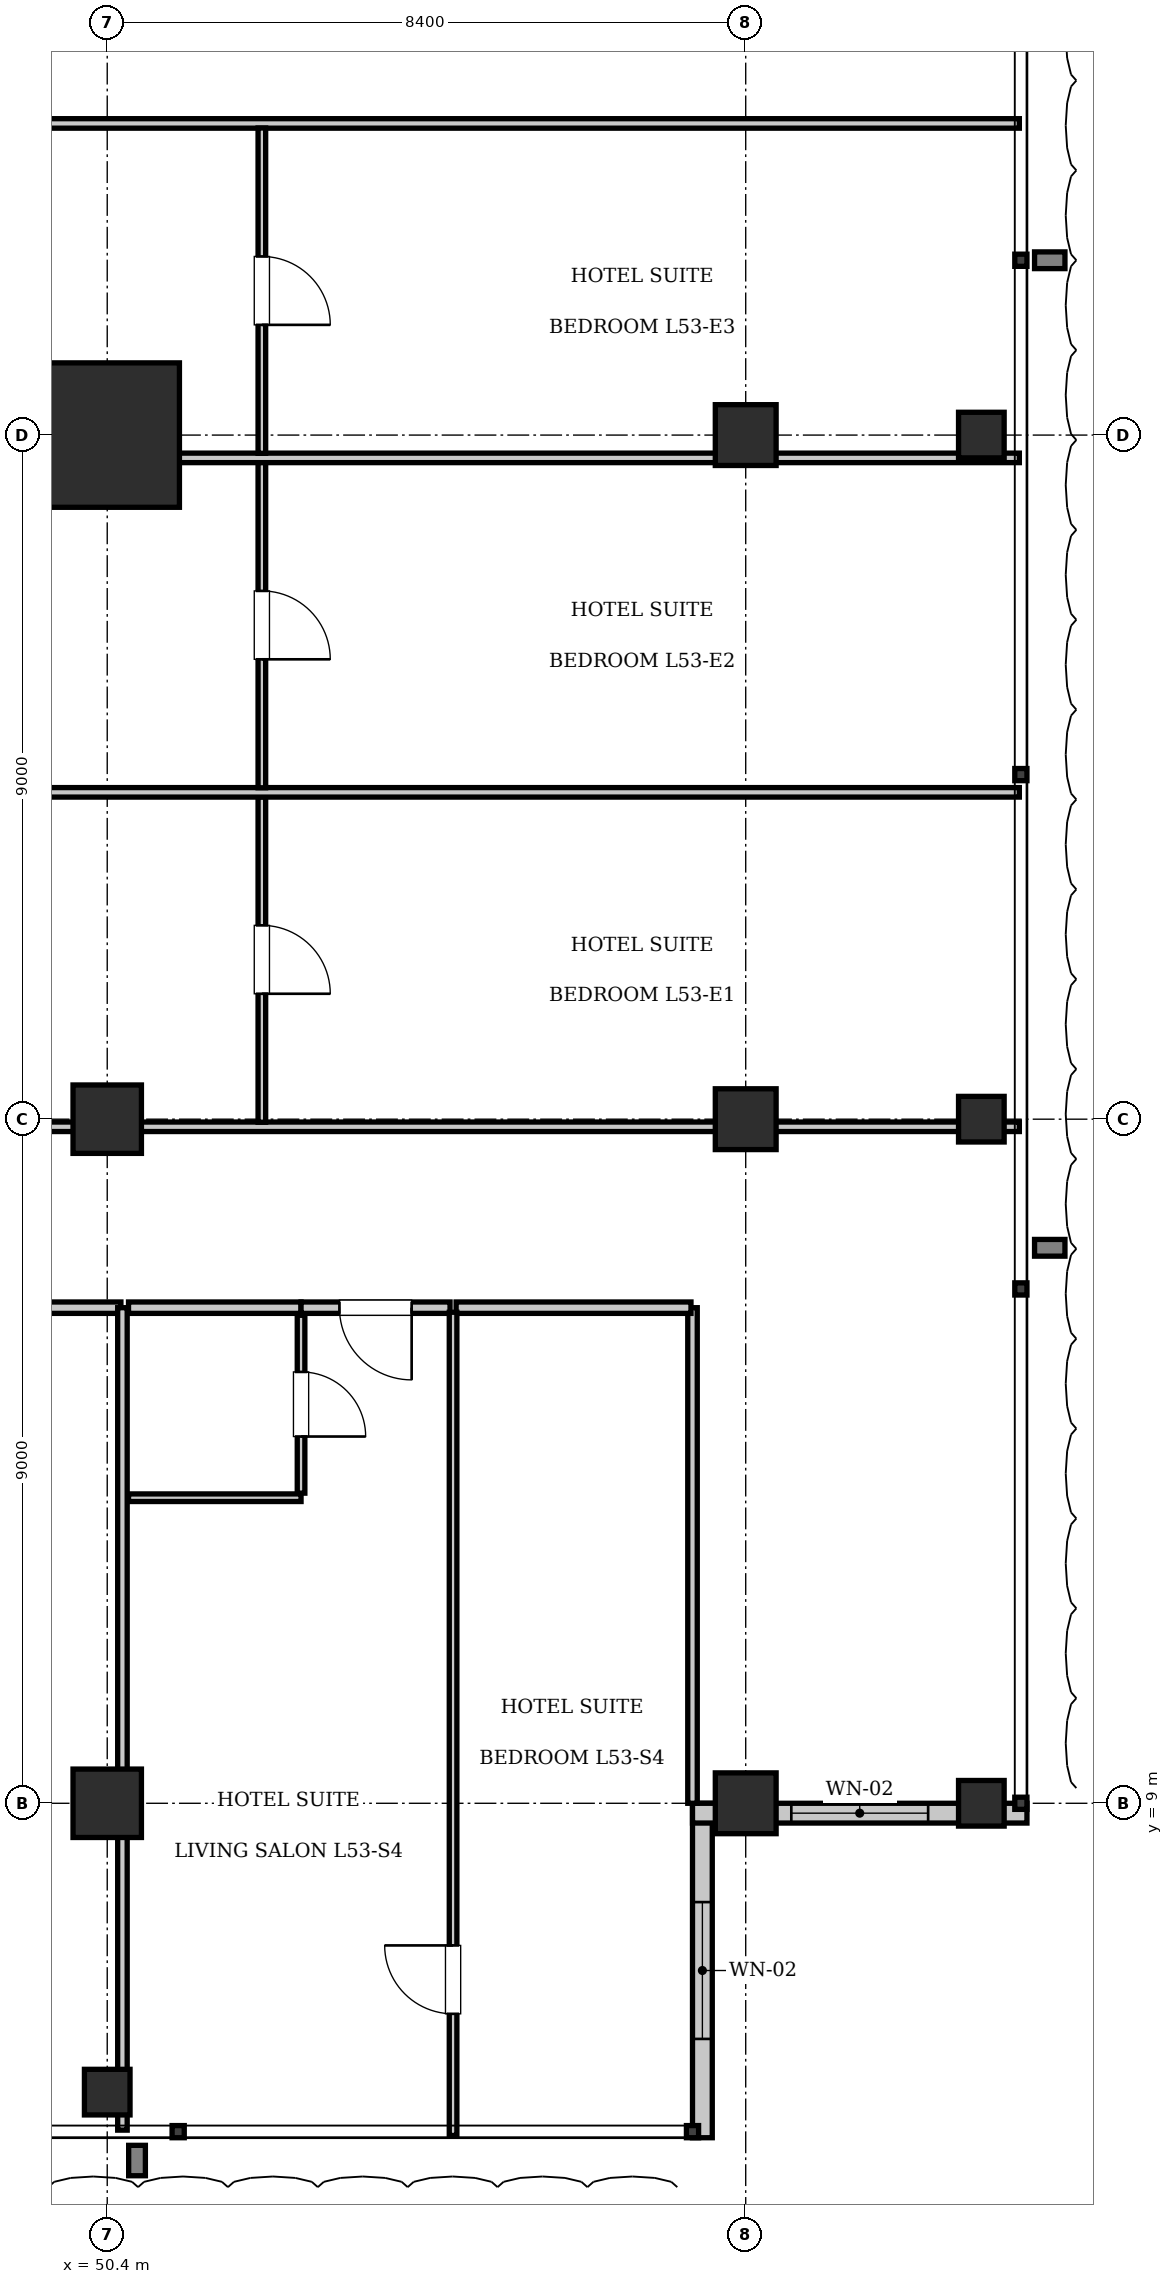
"""IFC4 building model, lengths in metres.
Left out: names, types, materials, properties, quantities, classifications, styles, units other than length and angle.
Written with IfcOpenShell. Run it as: python <this file> out.ifc"""

import sys

from ifc_helpers import new_model, si_unit, direction, frame, frame_2d, origin, origin_2d, place, context, subcontext, project, spatial, rectangle, i_section, extrude, element, fill, save


model = new_model("IFC4")
c1 = context("Model", 3, precision=1e-05, world=origin(), true_north=direction((0.0, 1.0)))
c2 = subcontext(c1, "Body", "Model", "MODEL_VIEW")
j1 = project(units=[si_unit("LENGTHUNIT", "METRE"), si_unit("PLANEANGLEUNIT", "RADIAN")], contexts=[c1])
p1 = place(None, origin())
s1 = spatial("IfcSite", under=j1, at=p1, CompositionType="ELEMENT")
p2 = place(p1, origin())
s2 = spatial("IfcBuilding", under=s1, at=p2, CompositionType="ELEMENT")
p3 = place(p2, frame((0.0, 0.0, 215.95)))
s3 = spatial("IfcBuildingStorey", under=s2, at=p3, CompositionType="ELEMENT", Elevation=215.95)
p4 = place(p3, frame((50.4, 27.0, 0.0), z_axis=(0.0, 0.0, 1.0), x_axis=(1.0, 0.0, 0.0)))
e1 = element("IfcColumn", 1, at=p4, inside=s3, PredefinedType="COLUMN", context=c2, shape_type="SweptSolid", body=[
    extrude(rectangle(XDim=1.9, YDim=1.9, at=origin_2d()), origin(), (0.0, 0.0, 1.0), 3.85),
])
for number, where, z_axis, x_axis in (
    (2, (50.4, 18.0, 0.0), (0.0, 0.0, 1.0), (1.0, 0.0, 0.0)),
    (3, (50.4, 9.0, 0.0), (0.0, 0.0, 1.0), (1.0, 0.0, 0.0)),
):
    element("IfcColumn", number, at=place(p3, frame(where, z_axis=z_axis, x_axis=x_axis)), inside=s3, PredefinedType="COLUMN", context=c2, shape_type="SweptSolid", body=[
        extrude(rectangle(XDim=0.9, YDim=0.9, at=origin_2d()), origin(), (0.0, 0.0, 1.0), 3.85),
    ])
for number, where, z_axis, x_axis in (
    (4, (58.8, 9.0, 0.0), (0.0, 0.0, 1.0), (1.0, 0.0, 0.0)),
    (5, (58.8, 18.0, 0.0), (0.0, 0.0, 1.0), (1.0, 0.0, 0.0)),
    (6, (58.8, 27.0, 0.0), (0.0, 0.0, 1.0), (1.0, 0.0, 0.0)),
):
    element("IfcColumn", number, at=place(p3, frame(where, z_axis=z_axis, x_axis=x_axis)), inside=s3, PredefinedType="COLUMN", context=c2, shape_type="SweptSolid", body=[
        extrude(rectangle(XDim=0.8, YDim=0.8, at=origin_2d()), origin(), (0.0, 0.0, 1.0), 3.85),
    ])
for number, where, z_axis, x_axis in (
    (7, (61.9, 9.0, 0.0), (0.0, 0.0, 1.0), (1.0, 0.0, 0.0)),
    (8, (61.9, 18.0, 0.0), (0.0, 0.0, 1.0), (1.0, 0.0, 0.0)),
    (9, (61.9, 27.0, 0.0), (0.0, 0.0, 1.0), (1.0, 0.0, 0.0)),
    (10, (50.4, 5.2, 0.0), (0.0, 0.0, 1.0), (1.0, 0.0, 0.0)),
):
    element("IfcColumn", number, at=place(p3, frame(where, z_axis=z_axis, x_axis=x_axis)), inside=s3, PredefinedType="COLUMN", context=c2, shape_type="SweptSolid", body=[
        extrude(i_section(OverallWidth=0.6, OverallDepth=0.6, WebThickness=0.025, FlangeThickness=0.038, at=origin_2d()), origin(), (0.0, 0.0, 1.0), 3.85),
    ])
p5 = place(p3, frame((58.23, 9.0, 0.0), z_axis=(0.0, 0.0, 1.0), x_axis=(0.0, -1.0, 0.0)))
e11 = element("IfcWall", 11, at=p5, inside=s3, PredefinedType="SOLIDWALL", context=c2, shape_type="SweptSolid", body=[
    extrude(rectangle(XDim=4.4, YDim=0.26, at=frame_2d((2.2, 0.0))), origin(), (0.0, 0.0, 1.0), 3.61),
])
p6 = place(p5, frame((1.3, 0.0, 0.9)))
e12 = element("IfcOpeningElement", 12, at=p6, cuts=e11, PredefinedType="OPENING", context=c2, shape_type="SweptSolid", body=[
    extrude(rectangle(XDim=1.8, YDim=2.1, at=frame_2d((0.9, 1.05))), frame((0.0, 0.14, 0.0), z_axis=(0.0, -1.0, 0.0), x_axis=(1.0, 0.0, 0.0)), (0.0, 0.0, 1.0), 0.28),
])
p7 = place(p3, frame((62.5, 8.87, 0.0), z_axis=(0.0, 0.0, 1.0), x_axis=(-1.0, 0.0, 0.0)))
e13 = element("IfcWall", 13, at=p7, inside=s3, PredefinedType="SOLIDWALL", context=c2, shape_type="SweptSolid", body=[
    extrude(rectangle(XDim=4.4, YDim=0.26, at=frame_2d((2.2, 0.0))), origin(), (0.0, 0.0, 1.0), 3.071),
])
p8 = place(p7, frame((1.3, 0.0, 0.9)))
e14 = element("IfcOpeningElement", 14, at=p8, cuts=e13, PredefinedType="OPENING", context=c2, shape_type="SweptSolid", body=[
    extrude(rectangle(XDim=1.8, YDim=2.1, at=frame_2d((0.9, 1.05))), frame((0.0, 0.14, 0.0), z_axis=(0.0, -1.0, 0.0), x_axis=(1.0, 0.0, 0.0)), (0.0, 0.0, 1.0), 0.28),
])
p9 = place(p3, frame((58.1, 9.0, 0.0), z_axis=(0.0, 0.0, 1.0), x_axis=(0.0, 1.0, 0.0)))
e15 = element("IfcWall", 15, at=p9, inside=s3, PredefinedType="PARTITIONING", context=c2, shape_type="SweptSolid", body=[
    extrude(rectangle(XDim=6.52, YDim=0.125, at=frame_2d((3.26, 0.0))), origin(), (0.0, 0.0, 1.0), 3.61),
])
p10 = place(p3, frame((45.008, 15.52, 0.0), z_axis=(0.0, 0.0, 1.0), x_axis=(1.0, 0.0, 0.0)))
e16 = element("IfcWall", 16, at=p10, inside=s3, PredefinedType="PARTITIONING", context=c2, shape_type="SweptSolid", body=[
    extrude(rectangle(XDim=5.572, YDim=0.15, at=frame_2d((2.786, 0.0))), origin(), (0.0, 0.0, 1.0), 3.61),
])
p11 = place(p3, frame((50.6, 4.7, 0.0), z_axis=(0.0, 0.0, 1.0), x_axis=(0.0, 1.0, 0.0)))
e17 = element("IfcWall", 17, at=p11, inside=s3, PredefinedType="PARTITIONING", context=c2, shape_type="SweptSolid", body=[
    extrude(rectangle(XDim=10.82, YDim=0.125, at=frame_2d((5.41, 0.0))), origin(), (0.0, 0.0, 1.0), 3.61),
])
p12 = place(p3, frame((50.68, 15.52, 0.0), z_axis=(0.0, 0.0, 1.0), x_axis=(1.0, 0.0, 0.0)))
e18 = element("IfcWall", 18, at=p12, inside=s3, PredefinedType="PARTITIONING", context=c2, shape_type="SweptSolid", body=[
    extrude(rectangle(XDim=2.27, YDim=0.15, at=frame_2d((1.135, 0.0))), origin(), (0.0, 0.0, 1.0), 3.61),
])
p13 = place(p3, frame((50.68, 13.02, 0.0), z_axis=(0.0, 0.0, 1.0), x_axis=(1.0, 0.0, 0.0)))
e19 = element("IfcWall", 19, at=p13, inside=s3, PredefinedType="PARTITIONING", context=c2, shape_type="SweptSolid", body=[
    extrude(rectangle(XDim=2.27, YDim=0.1, at=frame_2d((1.135, 0.0))), origin(), (0.0, 0.0, 1.0), 3.61),
])
p14 = place(p3, frame((52.95, 13.08, 0.0), z_axis=(0.0, 0.0, 1.0), x_axis=(0.0, 1.0, 0.0)))
e20 = element("IfcWall", 20, at=p14, inside=s3, PredefinedType="PARTITIONING", context=c2, shape_type="SweptSolid", body=[
    extrude(rectangle(XDim=2.34, YDim=0.1, at=frame_2d((1.17, 0.0))), origin(), (0.0, 0.0, 1.0), 3.61),
])
p15 = place(p14, frame((0.745, 0.0, 0.0)))
e21 = element("IfcOpeningElement", 21, at=p15, cuts=e20, PredefinedType="OPENING", context=c2, shape_type="SweptSolid", body=[
    extrude(rectangle(XDim=0.85, YDim=2.1, at=frame_2d((0.425, 1.05))), frame((0.0, 0.06, 0.0), z_axis=(0.0, -1.0, 0.0), x_axis=(1.0, 0.0, 0.0)), (0.0, 0.0, 1.0), 0.12),
])
p16 = place(p3, frame((52.95, 15.52, 0.0), z_axis=(0.0, 0.0, 1.0), x_axis=(1.0, 0.0, 0.0)))
e22 = element("IfcWall", 22, at=p16, inside=s3, PredefinedType="PARTITIONING", context=c2, shape_type="SweptSolid", body=[
    extrude(rectangle(XDim=1.96, YDim=0.15, at=frame_2d((0.98, 0.0))), origin(), (0.0, 0.0, 1.0), 3.61),
])
p17 = place(p16, frame((0.505, 0.0, 0.0)))
e23 = element("IfcOpeningElement", 23, at=p17, cuts=e22, PredefinedType="OPENING", context=c2, shape_type="SweptSolid", body=[
    extrude(rectangle(XDim=0.95, YDim=2.15, at=frame_2d((0.475, 1.075))), frame((0.0, 0.085, 0.0), z_axis=(0.0, -1.0, 0.0), x_axis=(1.0, 0.0, 0.0)), (0.0, 0.0, 1.0), 0.17),
])
p18 = place(p3, frame((54.99, 15.52, 0.0), z_axis=(0.0, 0.0, 1.0), x_axis=(1.0, 0.0, 0.0)))
e24 = element("IfcWall", 24, at=p18, inside=s3, PredefinedType="PARTITIONING", context=c2, shape_type="SweptSolid", body=[
    extrude(rectangle(XDim=3.09, YDim=0.15, at=frame_2d((1.545, 0.0))), origin(), (0.0, 0.0, 1.0), 3.61),
])
p19 = place(p3, frame((54.95, 4.63, 0.0), z_axis=(0.0, 0.0, 1.0), x_axis=(0.0, 1.0, 0.0)))
e25 = element("IfcWall", 25, at=p19, inside=s3, PredefinedType="PARTITIONING", context=c2, shape_type="SweptSolid", body=[
    extrude(rectangle(XDim=10.83, YDim=0.1, at=frame_2d((5.415, 0.0))), origin(), (0.0, 0.0, 1.0), 3.61),
])
p20 = place(p19, frame((1.6, 0.0, 0.0)))
e26 = element("IfcOpeningElement", 26, at=p20, cuts=e25, PredefinedType="OPENING", context=c2, shape_type="SweptSolid", body=[
    extrude(rectangle(XDim=0.9, YDim=2.1, at=frame_2d((0.45, 1.05))), frame((0.0, 0.06, 0.0), z_axis=(0.0, -1.0, 0.0), x_axis=(1.0, 0.0, 0.0)), (0.0, 0.0, 1.0), 0.12),
])
p21 = place(p3, frame((39.08, 17.9, 0.0), z_axis=(0.0, 0.0, 1.0), x_axis=(1.0, 0.0, 0.0)))
e27 = element("IfcWall", 27, at=p21, inside=s3, PredefinedType="PARTITIONING", context=c2, shape_type="SweptSolid", body=[
    extrude(rectangle(XDim=23.32, YDim=0.125, at=frame_2d((11.66, 0.0))), origin(), (0.0, 0.0, 1.0), 3.071),
])
p22 = place(p3, frame((39.08, 31.1, 0.0), z_axis=(0.0, 0.0, 1.0), x_axis=(1.0, 0.0, 0.0)))
e28 = element("IfcWall", 28, at=p22, inside=s3, PredefinedType="PARTITIONING", context=c2, shape_type="SweptSolid", body=[
    extrude(rectangle(XDim=23.32, YDim=0.125, at=frame_2d((11.66, 0.0))), origin(), (0.0, 0.0, 1.0), 3.61),
])
p23 = place(p3, frame((52.434, 17.96, 0.0), z_axis=(0.0, 0.0, 1.0), x_axis=(0.0, 1.0, 0.0)))
e29 = element("IfcWall", 29, at=p23, inside=s3, PredefinedType="PARTITIONING", context=c2, shape_type="SweptSolid", body=[
    extrude(rectangle(XDim=4.28, YDim=0.1, at=frame_2d((2.14, 0.0))), origin(), (0.0, 0.0, 1.0), 3.61),
])
p24 = place(p23, frame((1.69, 0.0, 0.0)))
e30 = element("IfcOpeningElement", 30, at=p24, cuts=e29, PredefinedType="OPENING", context=c2, shape_type="SweptSolid", body=[
    extrude(rectangle(XDim=0.9, YDim=2.1, at=frame_2d((0.45, 1.05))), frame((0.0, 0.06, 0.0), z_axis=(0.0, -1.0, 0.0), x_axis=(1.0, 0.0, 0.0)), (0.0, 0.0, 1.0), 0.12),
])
p25 = place(p3, frame((39.08, 22.3, 0.0), z_axis=(0.0, 0.0, 1.0), x_axis=(1.0, 0.0, 0.0)))
e31 = element("IfcWall", 31, at=p25, inside=s3, PredefinedType="PARTITIONING", context=c2, shape_type="SweptSolid", body=[
    extrude(rectangle(XDim=23.32, YDim=0.125, at=frame_2d((11.66, 0.0))), origin(), (0.0, 0.0, 1.0), 3.61),
])
p26 = place(p3, frame((52.434, 22.36, 0.0), z_axis=(0.0, 0.0, 1.0), x_axis=(0.0, 1.0, 0.0)))
e32 = element("IfcWall", 32, at=p26, inside=s3, PredefinedType="PARTITIONING", context=c2, shape_type="SweptSolid", body=[
    extrude(rectangle(XDim=4.28, YDim=0.1, at=frame_2d((2.14, 0.0))), origin(), (0.0, 0.0, 1.0), 3.61),
])
p27 = place(p26, frame((1.69, 0.0, 0.0)))
e33 = element("IfcOpeningElement", 33, at=p27, cuts=e32, PredefinedType="OPENING", context=c2, shape_type="SweptSolid", body=[
    extrude(rectangle(XDim=0.9, YDim=2.1, at=frame_2d((0.45, 1.05))), frame((0.0, 0.06, 0.0), z_axis=(0.0, -1.0, 0.0), x_axis=(1.0, 0.0, 0.0)), (0.0, 0.0, 1.0), 0.12),
])
p28 = place(p3, frame((39.08, 26.7, 0.0), z_axis=(0.0, 0.0, 1.0), x_axis=(1.0, 0.0, 0.0)))
e34 = element("IfcWall", 34, at=p28, inside=s3, PredefinedType="PARTITIONING", context=c2, shape_type="SweptSolid", body=[
    extrude(rectangle(XDim=23.32, YDim=0.125, at=frame_2d((11.66, 0.0))), origin(), (0.0, 0.0, 1.0), 3.61),
])
p29 = place(p3, frame((52.434, 26.76, 0.0), z_axis=(0.0, 0.0, 1.0), x_axis=(0.0, 1.0, 0.0)))
e35 = element("IfcWall", 35, at=p29, inside=s3, PredefinedType="PARTITIONING", context=c2, shape_type="SweptSolid", body=[
    extrude(rectangle(XDim=4.28, YDim=0.1, at=frame_2d((2.14, 0.0))), origin(), (0.0, 0.0, 1.0), 3.61),
])
p30 = place(p29, frame((1.69, 0.0, 0.0)))
e36 = element("IfcOpeningElement", 36, at=p30, cuts=e35, PredefinedType="OPENING", context=c2, shape_type="SweptSolid", body=[
    extrude(rectangle(XDim=0.9, YDim=2.1, at=frame_2d((0.45, 1.05))), frame((0.0, 0.06, 0.0), z_axis=(0.0, -1.0, 0.0), x_axis=(1.0, 0.0, 0.0)), (0.0, 0.0, 1.0), 0.12),
])
p31 = place(p6, origin())
e37 = element("IfcWindow", 37, at=p31, inside=s3, PartitioningType="SINGLE_PANEL", PredefinedType="WINDOW", context=c2, shape_type="SweptSolid", body=[
    extrude(rectangle(XDim=1.8, YDim=2.1, at=frame_2d((0.9, 1.05))), frame((0.0, 0.03, 0.0), z_axis=(0.0, -1.0, 0.0), x_axis=(1.0, 0.0, 0.0)), (0.0, 0.0, 1.0), 0.06),
])
fill(e12, e37)
p32 = place(p8, origin())
e38 = element("IfcWindow", 38, at=p32, inside=s3, PartitioningType="SINGLE_PANEL", PredefinedType="WINDOW", context=c2, shape_type="SweptSolid", body=[
    extrude(rectangle(XDim=1.8, YDim=2.1, at=frame_2d((0.9, 1.05))), frame((0.0, 0.03, 0.0), z_axis=(0.0, -1.0, 0.0), x_axis=(1.0, 0.0, 0.0)), (0.0, 0.0, 1.0), 0.06),
])
fill(e14, e38)
p33 = place(p15, frame((0.85, 0.0, 0.0), z_axis=(0.0, 0.0, 1.0), x_axis=(-1.0, 0.0, 0.0)))
e39 = element("IfcDoor", 39, at=p33, inside=s3, OperationType="SINGLE_SWING_RIGHT", PredefinedType="DOOR", context=c2, shape_type="SweptSolid", body=[
    extrude(rectangle(XDim=0.85, YDim=2.1, at=frame_2d((0.425, 1.05))), frame((0.0, 0.025, 0.0), z_axis=(0.0, -1.0, 0.0), x_axis=(1.0, 0.0, 0.0)), (0.0, 0.0, 1.0), 0.05),
])
fill(e21, e39)
p34 = place(p17, frame((0.95, 0.0, 0.0), z_axis=(0.0, 0.0, 1.0), x_axis=(-1.0, 0.0, 0.0)))
e40 = element("IfcDoor", 40, at=p34, inside=s3, OperationType="SINGLE_SWING_LEFT", PredefinedType="DOOR", context=c2, shape_type="SweptSolid", body=[
    extrude(rectangle(XDim=0.95, YDim=2.15, at=frame_2d((0.475, 1.075))), frame((0.0, 0.025, 0.0), z_axis=(0.0, -1.0, 0.0), x_axis=(1.0, 0.0, 0.0)), (0.0, 0.0, 1.0), 0.05),
])
fill(e23, e40)
p35 = place(p20, origin())
e41 = element("IfcDoor", 41, at=p35, inside=s3, OperationType="SINGLE_SWING_RIGHT", PredefinedType="DOOR", context=c2, shape_type="SweptSolid", body=[
    extrude(rectangle(XDim=0.9, YDim=2.1, at=frame_2d((0.45, 1.05))), frame((0.0, 0.025, 0.0), z_axis=(0.0, -1.0, 0.0), x_axis=(1.0, 0.0, 0.0)), (0.0, 0.0, 1.0), 0.05),
])
fill(e26, e41)
p36 = place(p24, frame((0.9, 0.0, 0.0), z_axis=(0.0, 0.0, 1.0), x_axis=(-1.0, 0.0, 0.0)))
e42 = element("IfcDoor", 42, at=p36, inside=s3, OperationType="SINGLE_SWING_RIGHT", PredefinedType="DOOR", context=c2, shape_type="SweptSolid", body=[
    extrude(rectangle(XDim=0.9, YDim=2.1, at=frame_2d((0.45, 1.05))), frame((0.0, 0.025, 0.0), z_axis=(0.0, -1.0, 0.0), x_axis=(1.0, 0.0, 0.0)), (0.0, 0.0, 1.0), 0.05),
])
fill(e30, e42)
p37 = place(p27, frame((0.9, 0.0, 0.0), z_axis=(0.0, 0.0, 1.0), x_axis=(-1.0, 0.0, 0.0)))
e43 = element("IfcDoor", 43, at=p37, inside=s3, OperationType="SINGLE_SWING_RIGHT", PredefinedType="DOOR", context=c2, shape_type="SweptSolid", body=[
    extrude(rectangle(XDim=0.9, YDim=2.1, at=frame_2d((0.45, 1.05))), frame((0.0, 0.025, 0.0), z_axis=(0.0, -1.0, 0.0), x_axis=(1.0, 0.0, 0.0)), (0.0, 0.0, 1.0), 0.05),
])
fill(e33, e43)
p38 = place(p30, frame((0.9, 0.0, 0.0), z_axis=(0.0, 0.0, 1.0), x_axis=(-1.0, 0.0, 0.0)))
e44 = element("IfcDoor", 44, at=p38, inside=s3, OperationType="SINGLE_SWING_RIGHT", PredefinedType="DOOR", context=c2, shape_type="SweptSolid", body=[
    extrude(rectangle(XDim=0.9, YDim=2.1, at=frame_2d((0.45, 1.05))), frame((0.0, 0.025, 0.0), z_axis=(0.0, -1.0, 0.0), x_axis=(1.0, 0.0, 0.0)), (0.0, 0.0, 1.0), 0.05),
])
fill(e36, e44)
save(model, sys.argv[1])
